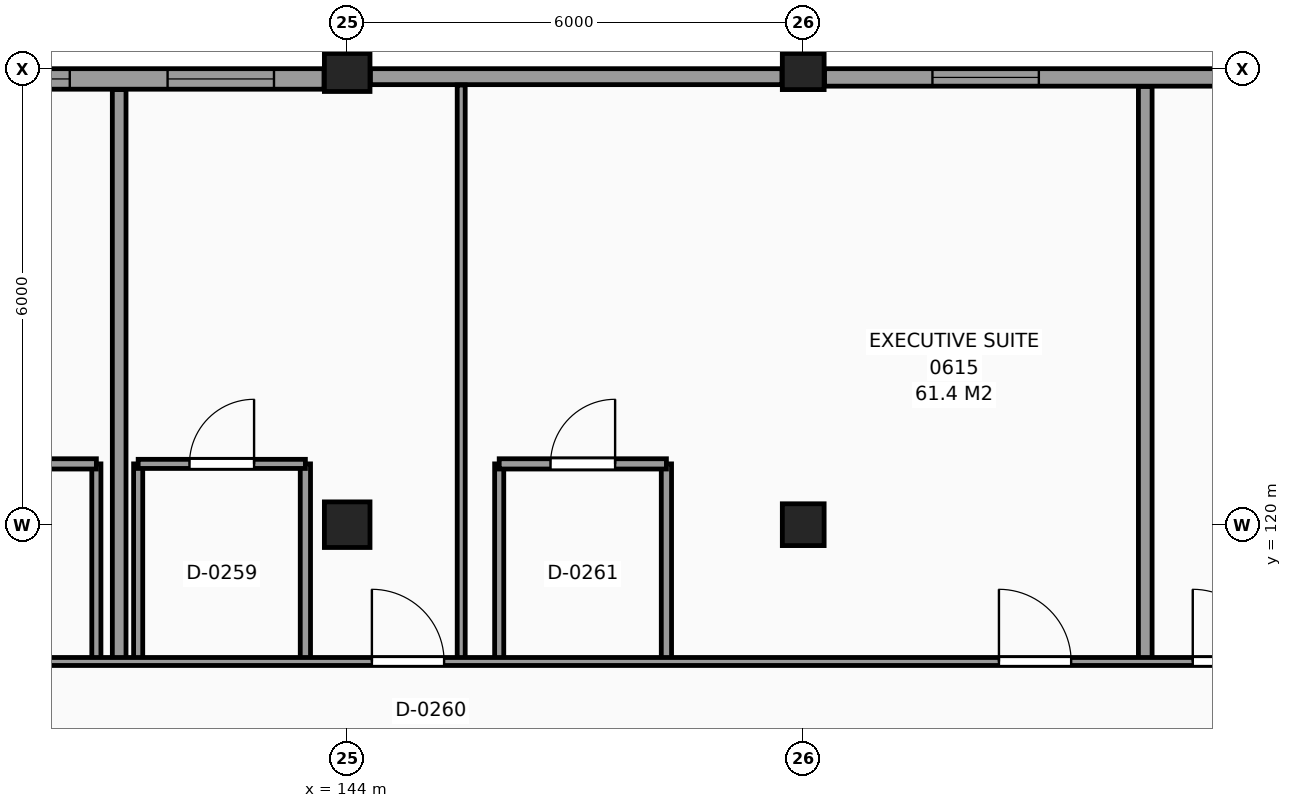
"""IFC4 building model, lengths in metres.
Left out: names, types, materials, properties, quantities, classifications, styles, units other than length and angle.
Written with IfcOpenShell. Run it as: python <this file> out.ifc"""

import sys

from ifc_helpers import new_model, si_unit, direction, frame, frame_2d, origin, origin_2d, place, context, subcontext, project, spatial, rectangle, extrude, element, fill, save


model = new_model("IFC4")
c1 = context("Model", 3, precision=1e-05, world=origin(), true_north=direction((0.0, 1.0)))
c2 = subcontext(c1, "Body", "Model", "MODEL_VIEW")
j1 = project(units=[si_unit("LENGTHUNIT", "METRE"), si_unit("PLANEANGLEUNIT", "RADIAN")], contexts=[c1])
p1 = place(None, origin())
s1 = spatial("IfcSite", under=j1, at=p1, CompositionType="ELEMENT")
p2 = place(p1, origin())
s2 = spatial("IfcBuilding", under=s1, at=p2, CompositionType="ELEMENT")
p3 = place(p2, frame((0.0, 0.0, 28.2)))
s3 = spatial("IfcBuildingStorey", under=s2, at=p3, CompositionType="ELEMENT", Elevation=28.2)
for number, where, z_axis, x_axis in (
    (1, (144.0, 120.0, 0.0), (0.0, 0.0, 1.0), (1.0, 0.0, 0.0)),
    (2, (144.0, 126.0, 0.0), (0.0, 0.0, 1.0), (1.0, 0.0, 0.0)),
):
    element("IfcColumn", number, at=place(p3, frame(where, z_axis=z_axis, x_axis=x_axis)), inside=s3, PredefinedType="COLUMN", context=c2, shape_type="SweptSolid", body=[
        extrude(rectangle(XDim=0.6, YDim=0.6, at=origin_2d()), origin(), (0.0, 0.0, 1.0), 3.3),
    ])
for number, where, z_axis, x_axis in (
    (3, (150.0, 120.0, 0.0), (0.0, 0.0, 1.0), (1.0, 0.0, 0.0)),
    (4, (150.0, 126.0, 0.0), (0.0, 0.0, 1.0), (1.0, 0.0, 0.0)),
):
    element("IfcColumn", number, at=place(p3, frame(where, z_axis=z_axis, x_axis=x_axis)), inside=s3, PredefinedType="COLUMN", context=c2, shape_type="SweptSolid", body=[
        extrude(rectangle(XDim=0.55, YDim=0.55, at=origin_2d()), origin(), (0.0, 0.0, 1.0), 3.3),
    ])
p4 = place(p3, frame((155.695, 125.885, 0.0), z_axis=(0.0, 0.0, 1.0), x_axis=(-1.0, 0.0, 0.0)))
e5 = element("IfcWall", 5, at=p4, inside=s3, PredefinedType="SOLIDWALL", context=c2, shape_type="SweptSolid", body=[
    extrude(rectangle(XDim=5.415, YDim=0.23, at=frame_2d((2.708, 0.0))), origin(), (0.0, 0.0, 1.0), 2.43),
])
p5 = place(p4, frame((2.595, 0.0, 0.8)))
e6 = element("IfcOpeningElement", 6, at=p5, cuts=e5, PredefinedType="OPENING", context=c2, shape_type="SweptSolid", body=[
    extrude(rectangle(XDim=1.4, YDim=1.4, at=frame_2d((0.7, 0.7))), frame((0.0, 0.125, 0.0), z_axis=(0.0, -1.0, 0.0), x_axis=(1.0, 0.0, 0.0)), (0.0, 0.0, 1.0), 0.25),
])
p6 = place(p3, frame((149.72, 125.895, 0.0), z_axis=(0.0, 0.0, 1.0), x_axis=(-1.0, 0.0, 0.0)))
e7 = element("IfcWall", 7, at=p6, inside=s3, PredefinedType="SOLIDWALL", context=c2, shape_type="SweptSolid", body=[
    extrude(rectangle(XDim=5.415, YDim=0.21, at=frame_2d((2.708, 0.0))), origin(), (0.0, 0.0, 1.0), 2.43),
])
p7 = place(p3, frame((143.695, 125.865, 0.0), z_axis=(0.0, 0.0, 1.0), x_axis=(-1.0, 0.0, 0.0)))
e8 = element("IfcWall", 8, at=p7, inside=s3, PredefinedType="SOLIDWALL", context=c2, shape_type="SweptSolid", body=[
    extrude(rectangle(XDim=5.415, YDim=0.27, at=frame_2d((2.708, 0.0))), origin(), (0.0, 0.0, 1.0), 2.43),
])
p8 = place(p7, frame((3.345, 0.0, 0.8)))
e9 = element("IfcOpeningElement", 9, at=p8, cuts=e8, PredefinedType="OPENING", context=c2, shape_type="SweptSolid", body=[
    extrude(rectangle(XDim=1.4, YDim=1.4, at=frame_2d((0.7, 0.7))), frame((0.0, 0.145, 0.0), z_axis=(0.0, -1.0, 0.0), x_axis=(1.0, 0.0, 0.0)), (0.0, 0.0, 1.0), 0.29),
])
p9 = place(p7, frame((0.658, 0.0, 0.8)))
e10 = element("IfcOpeningElement", 10, at=p9, cuts=e8, PredefinedType="OPENING", context=c2, shape_type="SweptSolid", body=[
    extrude(rectangle(XDim=1.4, YDim=1.4, at=frame_2d((0.7, 0.7))), frame((0.0, 0.145, 0.0), z_axis=(0.0, -1.0, 0.0), x_axis=(1.0, 0.0, 0.0)), (0.0, 0.0, 1.0), 0.29),
])
p10 = place(p3, frame((140.7, 118.2, 0.0), z_axis=(0.0, 0.0, 1.0), x_axis=(0.0, 1.0, 0.0)))
e11 = element("IfcWall", 11, at=p10, inside=s3, PredefinedType="PARTITIONING", context=c2, shape_type="SweptSolid", body=[
    extrude(rectangle(XDim=2.6, YDim=0.12, at=frame_2d((1.3, 0.0))), origin(), (0.0, 0.0, 1.0), 3.08),
])
p11 = place(p3, frame((141.0, 118.2, 0.0), z_axis=(0.0, 0.0, 1.0), x_axis=(0.0, 1.0, 0.0)))
e12 = element("IfcWall", 12, at=p11, inside=s3, PredefinedType="PARTITIONING", context=c2, shape_type="SweptSolid", body=[
    extrude(rectangle(XDim=7.525, YDim=0.18, at=frame_2d((3.763, 0.0))), origin(), (0.0, 0.0, 1.0), 3.08),
])
p12 = place(p3, frame((141.25, 118.2, 0.0), z_axis=(0.0, 0.0, 1.0), x_axis=(0.0, 1.0, 0.0)))
e13 = element("IfcWall", 13, at=p12, inside=s3, PredefinedType="PARTITIONING", context=c2, shape_type="SweptSolid", body=[
    extrude(rectangle(XDim=2.6, YDim=0.12, at=frame_2d((1.3, 0.0))), origin(), (0.0, 0.0, 1.0), 3.08),
])
p13 = place(p3, frame((143.45, 118.2, 0.0), z_axis=(0.0, 0.0, 1.0), x_axis=(0.0, 1.0, 0.0)))
e14 = element("IfcWall", 14, at=p13, inside=s3, PredefinedType="PARTITIONING", context=c2, shape_type="SweptSolid", body=[
    extrude(rectangle(XDim=2.6, YDim=0.135, at=frame_2d((1.3, 0.0))), origin(), (0.0, 0.0, 1.0), 3.08),
])
p14 = place(p3, frame((145.5, 118.2, 0.0), z_axis=(0.0, 0.0, 1.0), x_axis=(0.0, 1.0, 0.0)))
e15 = element("IfcWall", 15, at=p14, inside=s3, PredefinedType="PARTITIONING", context=c2, shape_type="SweptSolid", body=[
    extrude(rectangle(XDim=7.585, YDim=0.105, at=frame_2d((3.792, 0.0))), origin(), (0.0, 0.0, 1.0), 3.08),
])
p15 = place(p3, frame((146.0, 118.2, 0.0), z_axis=(0.0, 0.0, 1.0), x_axis=(0.0, 1.0, 0.0)))
e16 = element("IfcWall", 16, at=p15, inside=s3, PredefinedType="PARTITIONING", context=c2, shape_type="SweptSolid", body=[
    extrude(rectangle(XDim=2.6, YDim=0.12, at=frame_2d((1.3, 0.0))), origin(), (0.0, 0.0, 1.0), 3.08),
])
p16 = place(p3, frame((148.2, 118.2, 0.0), z_axis=(0.0, 0.0, 1.0), x_axis=(0.0, 1.0, 0.0)))
e17 = element("IfcWall", 17, at=p16, inside=s3, PredefinedType="PARTITIONING", context=c2, shape_type="SweptSolid", body=[
    extrude(rectangle(XDim=2.6, YDim=0.135, at=frame_2d((1.3, 0.0))), origin(), (0.0, 0.0, 1.0), 3.08),
])
p17 = place(p3, frame((154.5, 118.2, 0.0), z_axis=(0.0, 0.0, 1.0), x_axis=(0.0, 1.0, 0.0)))
e18 = element("IfcWall", 18, at=p17, inside=s3, PredefinedType="PARTITIONING", context=c2, shape_type="SweptSolid", body=[
    extrude(rectangle(XDim=7.565, YDim=0.18, at=frame_2d((3.782, 0.0))), origin(), (0.0, 0.0, 1.0), 3.08),
])
p18 = place(p3, frame((66.235, 118.2, 0.0), z_axis=(0.0, 0.0, 1.0), x_axis=(1.0, 0.0, 0.0)))
e19 = element("IfcWall", 19, at=p18, inside=s3, PredefinedType="PARTITIONING", context=c2, shape_type="SweptSolid", body=[
    extrude(rectangle(XDim=110.265, YDim=0.105, at=frame_2d((55.132, 0.0))), origin(), (0.0, 0.0, 1.0), 3.08),
])
p19 = place(p18, frame((0.49, 0.0, 0.0)))
e20 = element("IfcOpeningElement", 20, at=p19, cuts=e19, PredefinedType="OPENING", context=c2, shape_type="SweptSolid", body=[
    extrude(rectangle(XDim=0.95, YDim=2.1, at=frame_2d((0.475, 1.05))), frame((0.0, 0.062, 0.0), z_axis=(0.0, -1.0, 0.0), x_axis=(1.0, 0.0, 0.0)), (0.0, 0.0, 1.0), 0.125),
])
p20 = place(p18, frame((4.89, 0.0, 0.0)))
e21 = element("IfcOpeningElement", 21, at=p20, cuts=e19, PredefinedType="OPENING", context=c2, shape_type="SweptSolid", body=[
    extrude(rectangle(XDim=0.95, YDim=2.1, at=frame_2d((0.475, 1.05))), frame((0.0, 0.062, 0.0), z_axis=(0.0, -1.0, 0.0), x_axis=(1.0, 0.0, 0.0)), (0.0, 0.0, 1.0), 0.125),
])
p21 = place(p18, frame((9.39, 0.0, 0.0)))
e22 = element("IfcOpeningElement", 22, at=p21, cuts=e19, PredefinedType="OPENING", context=c2, shape_type="SweptSolid", body=[
    extrude(rectangle(XDim=0.95, YDim=2.1, at=frame_2d((0.475, 1.05))), frame((0.0, 0.062, 0.0), z_axis=(0.0, -1.0, 0.0), x_axis=(1.0, 0.0, 0.0)), (0.0, 0.0, 1.0), 0.125),
])
p22 = place(p18, frame((24.09, 0.0, 0.0)))
e23 = element("IfcOpeningElement", 23, at=p22, cuts=e19, PredefinedType="OPENING", context=c2, shape_type="SweptSolid", body=[
    extrude(rectangle(XDim=0.95, YDim=2.1, at=frame_2d((0.475, 1.05))), frame((0.0, 0.062, 0.0), z_axis=(0.0, -1.0, 0.0), x_axis=(1.0, 0.0, 0.0)), (0.0, 0.0, 1.0), 0.125),
])
p23 = place(p18, frame((32.34, 0.0, 0.0)))
e24 = element("IfcOpeningElement", 24, at=p23, cuts=e19, PredefinedType="OPENING", context=c2, shape_type="SweptSolid", body=[
    extrude(rectangle(XDim=0.95, YDim=2.1, at=frame_2d((0.475, 1.05))), frame((0.0, 0.062, 0.0), z_axis=(0.0, -1.0, 0.0), x_axis=(1.0, 0.0, 0.0)), (0.0, 0.0, 1.0), 0.125),
])
p24 = place(p18, frame((34.89, 0.0, 0.0)))
e25 = element("IfcOpeningElement", 25, at=p24, cuts=e19, PredefinedType="OPENING", context=c2, shape_type="SweptSolid", body=[
    extrude(rectangle(XDim=0.95, YDim=2.1, at=frame_2d((0.475, 1.05))), frame((0.0, 0.062, 0.0), z_axis=(0.0, -1.0, 0.0), x_axis=(1.0, 0.0, 0.0)), (0.0, 0.0, 1.0), 0.125),
])
p25 = place(p18, frame((42.09, 0.0, 0.0)))
e26 = element("IfcOpeningElement", 26, at=p25, cuts=e19, PredefinedType="OPENING", context=c2, shape_type="SweptSolid", body=[
    extrude(rectangle(XDim=0.95, YDim=2.1, at=frame_2d((0.475, 1.05))), frame((0.0, 0.062, 0.0), z_axis=(0.0, -1.0, 0.0), x_axis=(1.0, 0.0, 0.0)), (0.0, 0.0, 1.0), 0.125),
])
p26 = place(p18, frame((46.29, 0.0, 0.0)))
e27 = element("IfcOpeningElement", 27, at=p26, cuts=e19, PredefinedType="OPENING", context=c2, shape_type="SweptSolid", body=[
    extrude(rectangle(XDim=0.95, YDim=2.1, at=frame_2d((0.475, 1.05))), frame((0.0, 0.062, 0.0), z_axis=(0.0, -1.0, 0.0), x_axis=(1.0, 0.0, 0.0)), (0.0, 0.0, 1.0), 0.125),
])
p27 = place(p18, frame((48.49, 0.0, 0.0)))
e28 = element("IfcOpeningElement", 28, at=p27, cuts=e19, PredefinedType="OPENING", context=c2, shape_type="SweptSolid", body=[
    extrude(rectangle(XDim=0.95, YDim=2.1, at=frame_2d((0.475, 1.05))), frame((0.0, 0.062, 0.0), z_axis=(0.0, -1.0, 0.0), x_axis=(1.0, 0.0, 0.0)), (0.0, 0.0, 1.0), 0.125),
])
p28 = place(p18, frame((54.49, 0.0, 0.0)))
e29 = element("IfcOpeningElement", 29, at=p28, cuts=e19, PredefinedType="OPENING", context=c2, shape_type="SweptSolid", body=[
    extrude(rectangle(XDim=0.95, YDim=2.1, at=frame_2d((0.475, 1.05))), frame((0.0, 0.062, 0.0), z_axis=(0.0, -1.0, 0.0), x_axis=(1.0, 0.0, 0.0)), (0.0, 0.0, 1.0), 0.125),
])
p29 = place(p18, frame((64.29, 0.0, 0.0)))
e30 = element("IfcOpeningElement", 30, at=p29, cuts=e19, PredefinedType="OPENING", context=c2, shape_type="SweptSolid", body=[
    extrude(rectangle(XDim=0.95, YDim=2.1, at=frame_2d((0.475, 1.05))), frame((0.0, 0.062, 0.0), z_axis=(0.0, -1.0, 0.0), x_axis=(1.0, 0.0, 0.0)), (0.0, 0.0, 1.0), 0.125),
])
p30 = place(p18, frame((66.49, 0.0, 0.0)))
e31 = element("IfcOpeningElement", 31, at=p30, cuts=e19, PredefinedType="OPENING", context=c2, shape_type="SweptSolid", body=[
    extrude(rectangle(XDim=0.95, YDim=2.1, at=frame_2d((0.475, 1.05))), frame((0.0, 0.062, 0.0), z_axis=(0.0, -1.0, 0.0), x_axis=(1.0, 0.0, 0.0)), (0.0, 0.0, 1.0), 0.125),
])
p31 = place(p18, frame((70.89, 0.0, 0.0)))
e32 = element("IfcOpeningElement", 32, at=p31, cuts=e19, PredefinedType="OPENING", context=c2, shape_type="SweptSolid", body=[
    extrude(rectangle(XDim=0.95, YDim=2.1, at=frame_2d((0.475, 1.05))), frame((0.0, 0.062, 0.0), z_axis=(0.0, -1.0, 0.0), x_axis=(1.0, 0.0, 0.0)), (0.0, 0.0, 1.0), 0.125),
])
p32 = place(p18, frame((78.09, 0.0, 0.0)))
e33 = element("IfcOpeningElement", 33, at=p32, cuts=e19, PredefinedType="OPENING", context=c2, shape_type="SweptSolid", body=[
    extrude(rectangle(XDim=0.95, YDim=2.1, at=frame_2d((0.475, 1.05))), frame((0.0, 0.062, 0.0), z_axis=(0.0, -1.0, 0.0), x_axis=(1.0, 0.0, 0.0)), (0.0, 0.0, 1.0), 0.125),
])
p33 = place(p18, frame((86.34, 0.0, 0.0)))
e34 = element("IfcOpeningElement", 34, at=p33, cuts=e19, PredefinedType="OPENING", context=c2, shape_type="SweptSolid", body=[
    extrude(rectangle(XDim=0.95, YDim=2.1, at=frame_2d((0.475, 1.05))), frame((0.0, 0.062, 0.0), z_axis=(0.0, -1.0, 0.0), x_axis=(1.0, 0.0, 0.0)), (0.0, 0.0, 1.0), 0.125),
])
p34 = place(p18, frame((88.89, 0.0, 0.0)))
e35 = element("IfcOpeningElement", 35, at=p34, cuts=e19, PredefinedType="OPENING", context=c2, shape_type="SweptSolid", body=[
    extrude(rectangle(XDim=0.95, YDim=2.1, at=frame_2d((0.475, 1.05))), frame((0.0, 0.062, 0.0), z_axis=(0.0, -1.0, 0.0), x_axis=(1.0, 0.0, 0.0)), (0.0, 0.0, 1.0), 0.125),
])
p35 = place(p18, frame((93.39, 0.0, 0.0)))
e36 = element("IfcOpeningElement", 36, at=p35, cuts=e19, PredefinedType="OPENING", context=c2, shape_type="SweptSolid", body=[
    extrude(rectangle(XDim=0.95, YDim=2.1, at=frame_2d((0.475, 1.05))), frame((0.0, 0.062, 0.0), z_axis=(0.0, -1.0, 0.0), x_axis=(1.0, 0.0, 0.0)), (0.0, 0.0, 1.0), 0.125),
])
p36 = place(p18, frame((104.99, 0.0, 0.0)))
e37 = element("IfcOpeningElement", 37, at=p36, cuts=e19, PredefinedType="OPENING", context=c2, shape_type="SweptSolid", body=[
    extrude(rectangle(XDim=0.95, YDim=2.1, at=frame_2d((0.475, 1.05))), frame((0.0, 0.062, 0.0), z_axis=(0.0, -1.0, 0.0), x_axis=(1.0, 0.0, 0.0)), (0.0, 0.0, 1.0), 0.125),
])
p37 = place(p3, frame((138.5, 120.8, 0.0), z_axis=(0.0, 0.0, 1.0), x_axis=(1.0, 0.0, 0.0)))
e38 = element("IfcWall", 38, at=p37, inside=s3, PredefinedType="PARTITIONING", context=c2, shape_type="SweptSolid", body=[
    extrude(rectangle(XDim=2.2, YDim=0.135, at=frame_2d((1.1, 0.0))), origin(), (0.0, 0.0, 1.0), 3.08),
])
p38 = place(p37, frame((0.675, 0.0, 0.0)))
e39 = element("IfcOpeningElement", 39, at=p38, cuts=e38, PredefinedType="OPENING", context=c2, shape_type="SweptSolid", body=[
    extrude(rectangle(XDim=0.85, YDim=2.1, at=frame_2d((0.425, 1.05))), frame((0.0, 0.078, 0.0), z_axis=(0.0, -1.0, 0.0), x_axis=(1.0, 0.0, 0.0)), (0.0, 0.0, 1.0), 0.155),
])
p39 = place(p3, frame((141.25, 120.8, 0.0), z_axis=(0.0, 0.0, 1.0), x_axis=(1.0, 0.0, 0.0)))
e40 = element("IfcWall", 40, at=p39, inside=s3, PredefinedType="PARTITIONING", context=c2, shape_type="SweptSolid", body=[
    extrude(rectangle(XDim=2.2, YDim=0.12, at=frame_2d((1.1, 0.0))), origin(), (0.0, 0.0, 1.0), 3.08),
])
p40 = place(p39, frame((0.675, 0.0, 0.0)))
e41 = element("IfcOpeningElement", 41, at=p40, cuts=e40, PredefinedType="OPENING", context=c2, shape_type="SweptSolid", body=[
    extrude(rectangle(XDim=0.85, YDim=2.1, at=frame_2d((0.425, 1.05))), frame((0.0, 0.07, 0.0), z_axis=(0.0, -1.0, 0.0), x_axis=(1.0, 0.0, 0.0)), (0.0, 0.0, 1.0), 0.14),
])
p41 = place(p3, frame((146.0, 120.8, 0.0), z_axis=(0.0, 0.0, 1.0), x_axis=(1.0, 0.0, 0.0)))
e42 = element("IfcWall", 42, at=p41, inside=s3, PredefinedType="PARTITIONING", context=c2, shape_type="SweptSolid", body=[
    extrude(rectangle(XDim=2.2, YDim=0.135, at=frame_2d((1.1, 0.0))), origin(), (0.0, 0.0, 1.0), 3.08),
])
p42 = place(p41, frame((0.675, 0.0, 0.0)))
e43 = element("IfcOpeningElement", 43, at=p42, cuts=e42, PredefinedType="OPENING", context=c2, shape_type="SweptSolid", body=[
    extrude(rectangle(XDim=0.85, YDim=2.1, at=frame_2d((0.425, 1.05))), frame((0.0, 0.078, 0.0), z_axis=(0.0, -1.0, 0.0), x_axis=(1.0, 0.0, 0.0)), (0.0, 0.0, 1.0), 0.155),
])
p43 = place(p8, origin())
e44 = element("IfcWindow", 44, at=p43, inside=s3, PartitioningType="SINGLE_PANEL", PredefinedType="WINDOW", context=c2, shape_type="SweptSolid", body=[
    extrude(rectangle(XDim=1.4, YDim=1.4, at=frame_2d((0.7, 0.7))), frame((0.0, 0.03, 0.0), z_axis=(0.0, -1.0, 0.0), x_axis=(1.0, 0.0, 0.0)), (0.0, 0.0, 1.0), 0.06),
])
fill(e9, e44)
p44 = place(p9, origin())
e45 = element("IfcWindow", 45, at=p44, inside=s3, PartitioningType="SINGLE_PANEL", PredefinedType="WINDOW", context=c2, shape_type="SweptSolid", body=[
    extrude(rectangle(XDim=1.4, YDim=1.4, at=frame_2d((0.7, 0.7))), frame((0.0, 0.03, 0.0), z_axis=(0.0, -1.0, 0.0), x_axis=(1.0, 0.0, 0.0)), (0.0, 0.0, 1.0), 0.06),
])
fill(e10, e45)
p45 = place(p5, origin())
e46 = element("IfcWindow", 46, at=p45, inside=s3, PartitioningType="SINGLE_PANEL", PredefinedType="WINDOW", context=c2, shape_type="SweptSolid", body=[
    extrude(rectangle(XDim=1.4, YDim=1.4, at=frame_2d((0.7, 0.7))), frame((0.0, 0.03, 0.0), z_axis=(0.0, -1.0, 0.0), x_axis=(1.0, 0.0, 0.0)), (0.0, 0.0, 1.0), 0.06),
])
fill(e6, e46)
p46 = place(p40, origin())
e47 = element("IfcDoor", 47, at=p46, inside=s3, OperationType="SINGLE_SWING_RIGHT", PredefinedType="DOOR", context=c2, shape_type="SweptSolid", body=[
    extrude(rectangle(XDim=0.85, YDim=2.1, at=frame_2d((0.425, 1.05))), frame((0.0, 0.025, 0.0), z_axis=(0.0, -1.0, 0.0), x_axis=(1.0, 0.0, 0.0)), (0.0, 0.0, 1.0), 0.05),
])
fill(e41, e47)
p47 = place(p32, origin())
e48 = element("IfcDoor", 48, at=p47, inside=s3, OperationType="SINGLE_SWING_LEFT", PredefinedType="DOOR", context=c2, shape_type="SweptSolid", body=[
    extrude(rectangle(XDim=0.95, YDim=2.1, at=frame_2d((0.475, 1.05))), frame((0.0, 0.025, 0.0), z_axis=(0.0, -1.0, 0.0), x_axis=(1.0, 0.0, 0.0)), (0.0, 0.0, 1.0), 0.05),
])
fill(e33, e48)
p48 = place(p42, origin())
e49 = element("IfcDoor", 49, at=p48, inside=s3, OperationType="SINGLE_SWING_RIGHT", PredefinedType="DOOR", context=c2, shape_type="SweptSolid", body=[
    extrude(rectangle(XDim=0.85, YDim=2.1, at=frame_2d((0.425, 1.05))), frame((0.0, 0.025, 0.0), z_axis=(0.0, -1.0, 0.0), x_axis=(1.0, 0.0, 0.0)), (0.0, 0.0, 1.0), 0.05),
])
fill(e43, e49)
p49 = place(p33, origin())
e50 = element("IfcDoor", 50, at=p49, inside=s3, OperationType="SINGLE_SWING_LEFT", PredefinedType="DOOR", context=c2, shape_type="SweptSolid", body=[
    extrude(rectangle(XDim=0.95, YDim=2.1, at=frame_2d((0.475, 1.05))), frame((0.0, 0.025, 0.0), z_axis=(0.0, -1.0, 0.0), x_axis=(1.0, 0.0, 0.0)), (0.0, 0.0, 1.0), 0.05),
])
fill(e34, e50)
p50 = place(p34, origin())
e51 = element("IfcDoor", 51, at=p50, inside=s3, OperationType="SINGLE_SWING_LEFT", PredefinedType="DOOR", context=c2, shape_type="SweptSolid", body=[
    extrude(rectangle(XDim=0.95, YDim=2.1, at=frame_2d((0.475, 1.05))), frame((0.0, 0.025, 0.0), z_axis=(0.0, -1.0, 0.0), x_axis=(1.0, 0.0, 0.0)), (0.0, 0.0, 1.0), 0.05),
])
fill(e35, e51)
save(model, sys.argv[1])
